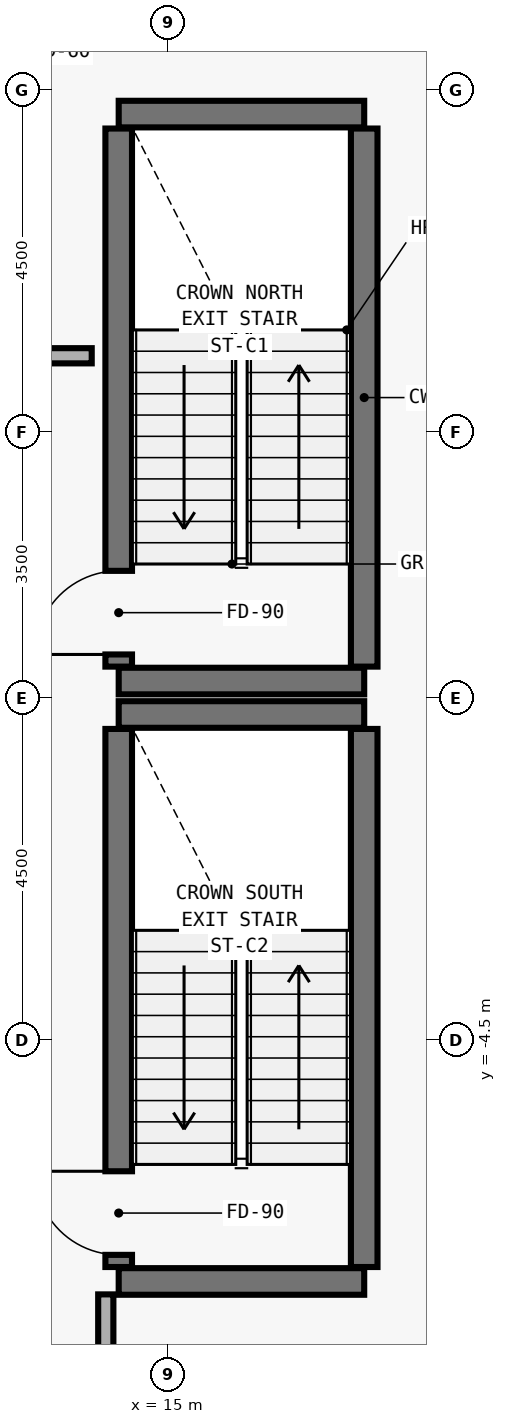
"""IFC4 building model, lengths in metres.
Left out: names, types, materials, properties, quantities, classifications, styles, units other than length and angle.
Written with IfcOpenShell. Run it as: python <this file> out.ifc"""

import sys

from ifc_helpers import new_model, si_unit, direction, frame, frame_2d, origin, place, context, subcontext, project, spatial, rectangle, extrude, element, fill, save


model = new_model("IFC4")
c1 = context("Model", 3, precision=1e-05, world=origin(), true_north=direction((0.0, 1.0)))
c2 = subcontext(c1, "Body", "Model", "MODEL_VIEW")
j1 = project(units=[si_unit("LENGTHUNIT", "METRE"), si_unit("PLANEANGLEUNIT", "RADIAN")], contexts=[c1])
p1 = place(None, origin())
s1 = spatial("IfcSite", under=j1, at=p1, CompositionType="ELEMENT")
p2 = place(p1, origin())
s2 = spatial("IfcBuilding", under=s1, at=p2, CompositionType="ELEMENT")
p3 = place(p2, frame((0.0, 0.0, 298.2)))
s3 = spatial("IfcBuildingStorey", under=s2, at=p3, CompositionType="ELEMENT", Elevation=298.2)
for number, where, z_axis, x_axis in (
    (1, (14.35, 0.22, 0.0), (0.0, 0.0, 1.0), (1.0, 0.0, 0.0)),
    (2, (14.35, 7.68, 0.0), (0.0, 0.0, 1.0), (1.0, 0.0, 0.0)),
):
    element("IfcWall", number, at=place(p3, frame(where, z_axis=z_axis, x_axis=x_axis)), inside=s3, PredefinedType="SHEAR", context=c2, shape_type="SweptSolid", body=[
        extrude(rectangle(XDim=3.23, YDim=0.35, at=frame_2d((1.615, 0.0))), origin(), (0.0, 0.0, 1.0), 4.192),
    ])
p4 = place(p3, frame((14.35, 0.41, 0.0), z_axis=(0.0, 0.0, 1.0), x_axis=(0.0, 1.0, 0.0)))
e3 = element("IfcWall", 3, at=p4, inside=s3, PredefinedType="SHEAR", context=c2, shape_type="SweptSolid", body=[
    extrude(rectangle(XDim=7.08, YDim=0.35, at=frame_2d((3.54, 0.0))), origin(), (0.0, 0.0, 1.0), 4.192),
])
p5 = place(p4, frame((0.16, 0.0, 0.0)))
e4 = element("IfcOpeningElement", 4, at=p5, cuts=e3, PredefinedType="OPENING", context=c2, shape_type="SweptSolid", body=[
    extrude(rectangle(XDim=1.1, YDim=2.15, at=frame_2d((0.55, 1.075))), frame((0.0, 0.185, 0.0), z_axis=(0.0, -1.0, 0.0), x_axis=(1.0, 0.0, 0.0)), (0.0, 0.0, 1.0), 0.37),
])
p6 = place(p3, frame((17.58, 0.41, 0.0), z_axis=(0.0, 0.0, 1.0), x_axis=(0.0, 1.0, 0.0)))
e5 = element("IfcWall", 5, at=p6, inside=s3, PredefinedType="SHEAR", context=c2, shape_type="SweptSolid", body=[
    extrude(rectangle(XDim=7.08, YDim=0.35, at=frame_2d((3.54, 0.0))), origin(), (0.0, 0.0, 1.0), 4.192),
])
for number, where, z_axis, x_axis in (
    (6, (14.35, -7.68, 0.0), (0.0, 0.0, 1.0), (1.0, 0.0, 0.0)),
    (7, (14.35, -0.22, 0.0), (0.0, 0.0, 1.0), (1.0, 0.0, 0.0)),
):
    element("IfcWall", number, at=place(p3, frame(where, z_axis=z_axis, x_axis=x_axis)), inside=s3, PredefinedType="SHEAR", context=c2, shape_type="SweptSolid", body=[
        extrude(rectangle(XDim=3.23, YDim=0.35, at=frame_2d((1.615, 0.0))), origin(), (0.0, 0.0, 1.0), 4.192),
    ])
p7 = place(p3, frame((14.35, -7.49, 0.0), z_axis=(0.0, 0.0, 1.0), x_axis=(0.0, 1.0, 0.0)))
e8 = element("IfcWall", 8, at=p7, inside=s3, PredefinedType="SHEAR", context=c2, shape_type="SweptSolid", body=[
    extrude(rectangle(XDim=7.08, YDim=0.35, at=frame_2d((3.54, 0.0))), origin(), (0.0, 0.0, 1.0), 4.192),
])
p8 = place(p7, frame((0.16, 0.0, 0.0)))
e9 = element("IfcOpeningElement", 9, at=p8, cuts=e8, PredefinedType="OPENING", context=c2, shape_type="SweptSolid", body=[
    extrude(rectangle(XDim=1.1, YDim=2.15, at=frame_2d((0.55, 1.075))), frame((0.0, 0.185, 0.0), z_axis=(0.0, -1.0, 0.0), x_axis=(1.0, 0.0, 0.0)), (0.0, 0.0, 1.0), 0.37),
])
p9 = place(p3, frame((17.58, -7.49, 0.0), z_axis=(0.0, 0.0, 1.0), x_axis=(0.0, 1.0, 0.0)))
e10 = element("IfcWall", 10, at=p9, inside=s3, PredefinedType="SHEAR", context=c2, shape_type="SweptSolid", body=[
    extrude(rectangle(XDim=7.08, YDim=0.35, at=frame_2d((3.54, 0.0))), origin(), (0.0, 0.0, 1.0), 4.192),
])
p10 = place(p3, frame((13.995, 4.5, 0.0), z_axis=(0.0, 0.0, 1.0), x_axis=(-1.0, 0.0, 0.0)))
e11 = element("IfcWall", 11, at=p10, inside=s3, PredefinedType="MOVABLE", context=c2, shape_type="SweptSolid", body=[
    extrude(rectangle(XDim=2.085, YDim=0.2, at=frame_2d((1.042, 0.0))), origin(), (0.0, 0.0, 1.0), 3.96),
])
p11 = place(p3, frame((14.18, -8.69, 0.0), z_axis=(0.0, 0.0, 1.0), x_axis=(0.0, 1.0, 0.0)))
e12 = element("IfcWall", 12, at=p11, inside=s3, PredefinedType="MOVABLE", context=c2, shape_type="SweptSolid", body=[
    extrude(rectangle(XDim=0.84, YDim=0.2, at=frame_2d((0.42, 0.0))), origin(), (0.0, 0.0, 1.0), 3.96),
])
p12 = place(p5, origin())
e13 = element("IfcDoor", 13, at=p12, inside=s3, OperationType="SINGLE_SWING_LEFT", PredefinedType="DOOR", context=c2, shape_type="SweptSolid", body=[
    extrude(rectangle(XDim=1.1, YDim=2.15, at=frame_2d((0.55, 1.075))), frame((0.0, 0.025, 0.0), z_axis=(0.0, -1.0, 0.0), x_axis=(1.0, 0.0, 0.0)), (0.0, 0.0, 1.0), 0.05),
])
fill(e4, e13)
p13 = place(p8, origin())
e14 = element("IfcDoor", 14, at=p13, inside=s3, OperationType="SINGLE_SWING_RIGHT", PredefinedType="DOOR", context=c2, shape_type="SweptSolid", body=[
    extrude(rectangle(XDim=1.1, YDim=2.15, at=frame_2d((0.55, 1.075))), frame((0.0, 0.025, 0.0), z_axis=(0.0, -1.0, 0.0), x_axis=(1.0, 0.0, 0.0)), (0.0, 0.0, 1.0), 0.05),
])
fill(e9, e14)
save(model, sys.argv[1])
